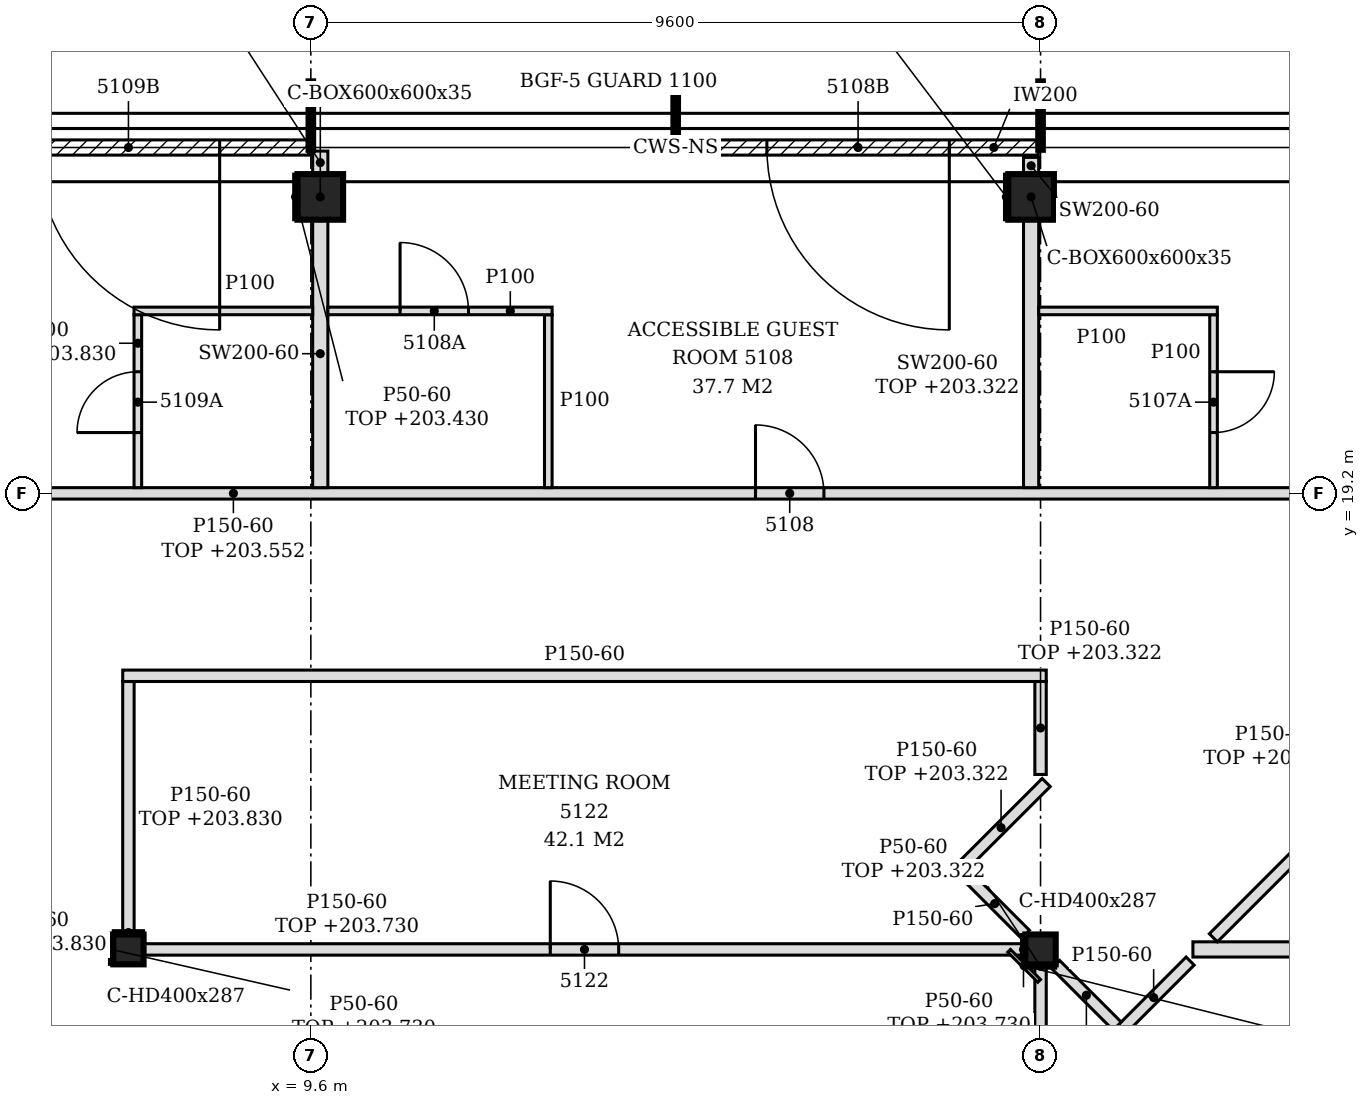
"""IFC4 building model, lengths in metres.
Left out: names, types, materials, properties, quantities, classifications, styles, units other than length and angle.
Written with IfcOpenShell. Run it as: python <this file> out.ifc"""

import sys

from ifc_helpers import new_model, si_unit, direction, frame, frame_2d, origin, origin_2d, place, context, subcontext, project, spatial, polyline, rectangle, hollow_rectangle, i_section, outline, extrude, clip, halfspace, element, fill, save


model = new_model("IFC4")
c1 = context("Model", 3, precision=1e-05, world=origin(), true_north=direction((0.0, 1.0)))
c2 = subcontext(c1, "Body", "Model", "MODEL_VIEW")
j1 = project(units=[si_unit("LENGTHUNIT", "METRE"), si_unit("PLANEANGLEUNIT", "RADIAN")], contexts=[c1])
p1 = place(None, origin())
s1 = spatial("IfcSite", under=j1, at=p1, CompositionType="ELEMENT")
p2 = place(p1, origin())
s2 = spatial("IfcBuilding", under=s1, at=p2, CompositionType="ELEMENT")
p3 = place(p2, frame((0.0, 0.0, 201.0)))
s3 = spatial("IfcBuildingStorey", under=s2, at=p3, CompositionType="ELEMENT", Elevation=201.0)
for number, where, z_axis, x_axis in (
    (1, (19.076, 23.1, -0.15), (0.0, 0.0, 1.0), (1.0, 0.0, 0.0)),
    (2, (9.724, 23.1, -0.15), (0.0, 0.0, 1.0), (1.0, 0.0, 0.0)),
):
    element("IfcColumn", number, at=place(p3, frame(where, z_axis=z_axis, x_axis=x_axis)), inside=s3, PredefinedType="COLUMN", context=c2, shape_type="Clipping", body=[
        clip(clip(extrude(hollow_rectangle(XDim=0.6, YDim=0.6, WallThickness=0.035, at=origin_2d()), origin(), (0.0, 0.0, 1.0), 3.5), halfspace(frame((0.0, 0.0, 0.011), z_axis=(0.0, 0.0, 1.0), x_axis=(1.0, 0.0, 0.0)), True)), halfspace(frame((0.0, 0.0, 3.095), z_axis=(0.0, 0.0, 1.0), x_axis=(1.0, 0.0, 0.0)), False)),
    ])
for number, where, z_axis, x_axis in (
    (3, (7.2, 13.2, -0.15), (0.0, 0.0, 1.0), (1.0, 0.0, 0.0)),
    (4, (19.2, 13.2, -0.15), (0.0, 0.0, 1.0), (1.0, 0.0, 0.0)),
):
    element("IfcColumn", number, at=place(p3, frame(where, z_axis=z_axis, x_axis=x_axis)), inside=s3, PredefinedType="COLUMN", context=c2, shape_type="SweptSolid", body=[
        extrude(i_section(OverallWidth=0.399, OverallDepth=0.393, WebThickness=0.023, FlangeThickness=0.037, FilletRadius=0.015, at=origin_2d()), origin(), (0.0, 0.0, 1.0), 3.5),
    ])
p4 = place(p3, frame((19.17, 23.75, 0.0), z_axis=(0.0, 0.0, 1.0), x_axis=(-1.0, 0.0, 0.0)))
e5 = element("IfcWall", 5, at=p4, inside=s3, PredefinedType="NOTDEFINED", context=c2, shape_type="SweptSolid", body=[
    extrude(rectangle(XDim=4.74, YDim=0.2, at=frame_2d((2.37, 0.0))), origin(), (0.0, 0.0, 1.0), 3.35),
])
p5 = place(p4, frame((1.17, 0.0, 0.0)))
e6 = element("IfcOpeningElement", 6, at=p5, cuts=e5, PredefinedType="OPENING", context=c2, shape_type="SweptSolid", body=[
    extrude(rectangle(XDim=2.4, YDim=2.4, at=frame_2d((1.2, 1.2))), frame((0.0, 0.11, 0.0), z_axis=(0.0, -1.0, 0.0), x_axis=(1.0, 0.0, 0.0)), (0.0, 0.0, 1.0), 0.22),
])
p6 = place(p3, frame((9.57, 23.75, 0.0), z_axis=(0.0, 0.0, 1.0), x_axis=(-1.0, 0.0, 0.0)))
e7 = element("IfcWall", 7, at=p6, inside=s3, PredefinedType="NOTDEFINED", context=c2, shape_type="SweptSolid", body=[
    extrude(rectangle(XDim=4.74, YDim=0.2, at=frame_2d((2.37, 0.0))), origin(), (0.0, 0.0, 1.0), 3.35),
])
p7 = place(p6, frame((1.17, 0.0, 0.0)))
e8 = element("IfcOpeningElement", 8, at=p7, cuts=e7, PredefinedType="OPENING", context=c2, shape_type="SweptSolid", body=[
    extrude(rectangle(XDim=2.4, YDim=2.4, at=frame_2d((1.2, 1.2))), frame((0.0, 0.11, 0.0), z_axis=(0.0, -1.0, 0.0), x_axis=(1.0, 0.0, 0.0)), (0.0, 0.0, 1.0), 0.22),
])
p8 = place(p3, frame((19.2, 2.596, 0.0), z_axis=(0.0, 0.0, 1.0), x_axis=(0.0, 1.0, 0.0)))
e9 = element("IfcWall", 9, at=p8, inside=s3, PredefinedType="PARTITIONING", context=c2, shape_type="SweptSolid", body=[
    extrude(rectangle(XDim=10.407, YDim=0.15, at=frame_2d((5.204, 0.0))), origin(), (0.0, 0.0, 1.0), 2.322),
])
p9 = place(p8, frame((3.553, 0.0, 0.0)))
e10 = element("IfcOpeningElement", 10, at=p9, cuts=e9, PredefinedType="OPENING", context=c2, shape_type="SweptSolid", body=[
    extrude(rectangle(XDim=0.9, YDim=2.1, at=frame_2d((0.45, 1.05))), frame((0.0, 0.085, 0.0), z_axis=(0.0, -1.0, 0.0), x_axis=(1.0, 0.0, 0.0)), (0.0, 0.0, 1.0), 0.17),
])
p10 = place(p3, frame((20.208, 12.086, 0.0), z_axis=(0.0, 0.0, 1.0), x_axis=(0.706747296365, 0.707466083343, 0.0)))
e11 = element("IfcWall", 11, at=p10, inside=s3, PredefinedType="PARTITIONING", context=c2, shape_type="SweptSolid", body=[
    extrude(rectangle(XDim=1.359, YDim=0.15, at=frame_2d((0.679, 0.0))), origin(), (0.0, 0.0, 1.0), 3.35),
])
p11 = place(p3, frame((20.208, 12.192, 0.0), z_axis=(0.0, 0.0, 1.0), x_axis=(-0.70721334539, 0.707000200921, 0.0)))
e12 = element("IfcWall", 12, at=p11, inside=s3, PredefinedType="PARTITIONING", context=c2, shape_type="SweptSolid", body=[
    extrude(rectangle(XDim=1.146, YDim=0.15, at=frame_2d((0.573, 0.0))), origin(), (0.0, 0.0, 1.0), 3.35),
])
p12 = place(p3, frame((7.399, 13.2, 0.0), z_axis=(0.0, 0.0, 1.0), x_axis=(1.0, 0.0, 0.0)))
e13 = element("IfcWall", 13, at=p12, inside=s3, PredefinedType="PARTITIONING", context=c2, shape_type="SweptSolid", body=[
    extrude(rectangle(XDim=11.601, YDim=0.15, at=frame_2d((5.801, 0.0))), origin(), (0.0, 0.0, 1.0), 2.73),
])
p13 = place(p12, frame((5.351, 0.0, 0.0)))
e14 = element("IfcOpeningElement", 14, at=p13, cuts=e13, PredefinedType="OPENING", context=c2, shape_type="SweptSolid", body=[
    extrude(rectangle(XDim=0.9, YDim=2.1, at=frame_2d((0.45, 1.05))), frame((0.0, 0.085, 0.0), z_axis=(0.0, -1.0, 0.0), x_axis=(1.0, 0.0, 0.0)), (0.0, 0.0, 1.0), 0.17),
])
p14 = place(p3, frame((21.205, 13.2, 0.0), z_axis=(0.0, 0.0, 1.0), x_axis=(1.0, 0.0, 0.0)))
e15 = element("IfcWall", 15, at=p14, inside=s3, PredefinedType="PARTITIONING", context=c2, shape_type="SweptSolid", body=[
    extrude(rectangle(XDim=8.007, YDim=0.2, at=frame_2d((4.004, 0.0))), origin(), (0.0, 0.0, 1.0), 3.35),
])
p15 = place(p3, frame((7.2, 13.396, 0.0), z_axis=(0.0, 0.0, 1.0), x_axis=(0.0, 1.0, 0.0)))
e16 = element("IfcWall", 16, at=p15, inside=s3, PredefinedType="PARTITIONING", context=c2, shape_type="SweptSolid", body=[
    extrude(rectangle(XDim=3.329, YDim=0.15, at=frame_2d((1.664, 0.0))), origin(), (0.0, 0.0, 1.0), 2.83),
])
p16 = place(p3, frame((19.002, 13.398, 0.0), z_axis=(0.0, 0.0, 1.0), x_axis=(-0.707000200921, 0.70721334539, 0.0)))
e17 = element("IfcWall", 17, at=p16, inside=s3, PredefinedType="PARTITIONING", context=c2, shape_type="SweptSolid", body=[
    extrude(rectangle(XDim=1.146, YDim=0.15, at=frame_2d((0.573, 0.0))), origin(), (0.0, 0.0, 1.0), 3.35),
])
p17 = place(p3, frame((21.474, 13.353, 0.0), z_axis=(0.0, 0.0, 1.0), x_axis=(0.707080773618, 0.707132787799, 0.0)))
e18 = element("IfcWall", 18, at=p17, inside=s3, PredefinedType="PARTITIONING", context=c2, shape_type="SweptSolid", body=[
    extrude(rectangle(XDim=4.694, YDim=0.15, at=frame_2d((2.347, 0.0))), origin(), (0.0, 0.0, 1.0), 2.78),
])
p18 = place(p3, frame((18.086, 14.208, 0.0), z_axis=(0.0, 0.0, 1.0), x_axis=(0.70739723372, 0.706816209298, 0.0)))
e19 = element("IfcWall", 19, at=p18, inside=s3, PredefinedType="PARTITIONING", context=c2, shape_type="SweptSolid", body=[
    extrude(rectangle(XDim=1.681, YDim=0.15, at=frame_2d((0.84, 0.0))), origin(), (0.0, 0.0, 1.0), 2.322),
])
p19 = place(p3, frame((19.2, 15.502, 0.0), z_axis=(0.0, 0.0, 1.0), x_axis=(0.0, 1.0, 0.0)))
e20 = element("IfcWall", 20, at=p19, inside=s3, PredefinedType="PARTITIONING", context=c2, shape_type="SweptSolid", body=[
    extrude(rectangle(XDim=1.223, YDim=0.15, at=frame_2d((0.612, 0.0))), origin(), (0.0, 0.0, 1.0), 2.322),
])
p20 = place(p3, frame((7.125, 16.8, 0.0), z_axis=(0.0, 0.0, 1.0), x_axis=(1.0, 0.0, 0.0)))
e21 = element("IfcWall", 21, at=p20, inside=s3, PredefinedType="PARTITIONING", context=c2, shape_type="SweptSolid", body=[
    extrude(outline(polyline([(0.0, 0.0), (12.15, 0.0), (12.15, 2.322), (11.924, 2.322), (11.922, 3.35), (0.225, 3.35), (0.223, 2.83), (0.0, 2.83), (0.0, 0.0)])), frame((0.0, 0.075, 0.0), z_axis=(0.0, -1.0, 0.0), x_axis=(1.0, 0.0, 0.0)), (0.0, 0.0, 1.0), 0.15),
])
p21 = place(p3, frame((-4.326, 19.2, 0.0), z_axis=(0.0, 0.0, 1.0), x_axis=(1.0, 0.0, 0.0)))
e22 = element("IfcWall", 22, at=p21, inside=s3, PredefinedType="PARTITIONING", context=c2, shape_type="SweptSolid", body=[
    extrude(outline(polyline([(0.0, 0.0), (31.244, 0.0), (31.244, 2.552), (23.677, 2.552), (23.675, 2.322), (23.375, 2.322), (23.373, 2.552), (1.51, 2.552), (1.508, 2.43), (0.087, 2.43), (0.085, 2.552), (0.0, 2.552), (0.0, 0.0)])), frame((0.0, 0.075, 0.0), z_axis=(0.0, -1.0, 0.0), x_axis=(1.0, 0.0, 0.0)), (0.0, 0.0, 1.0), 0.15),
])
p22 = place(p21, frame((28.02, 0.0, 0.0)))
e23 = element("IfcOpeningElement", 23, at=p22, cuts=e22, PredefinedType="OPENING", context=c2, shape_type="SweptSolid", body=[
    extrude(rectangle(XDim=0.9, YDim=2.1, at=frame_2d((0.45, 1.05))), frame((0.0, 0.085, 0.0), z_axis=(0.0, -1.0, 0.0), x_axis=(1.0, 0.0, 0.0)), (0.0, 0.0, 1.0), 0.17),
])
p23 = place(p21, frame((19.776, 0.0, 0.0)))
e24 = element("IfcOpeningElement", 24, at=p23, cuts=e22, PredefinedType="OPENING", context=c2, shape_type="SweptSolid", body=[
    extrude(rectangle(XDim=0.9, YDim=2.1, at=frame_2d((0.45, 1.05))), frame((0.0, 0.085, 0.0), z_axis=(0.0, -1.0, 0.0), x_axis=(1.0, 0.0, 0.0)), (0.0, 0.0, 1.0), 0.17),
])
p24 = place(p21, frame((5.138, 0.0, 0.0)))
e25 = element("IfcOpeningElement", 25, at=p24, cuts=e22, PredefinedType="OPENING", context=c2, shape_type="SweptSolid", body=[
    extrude(rectangle(XDim=0.9, YDim=2.1, at=frame_2d((0.45, 1.05))), frame((0.0, 0.085, 0.0), z_axis=(0.0, -1.0, 0.0), x_axis=(1.0, 0.0, 0.0)), (0.0, 0.0, 1.0), 0.17),
])
p25 = place(p3, frame((7.324, 19.275, 0.0), z_axis=(0.0, 0.0, 1.0), x_axis=(0.0, 1.0, 0.0)))
e26 = element("IfcWall", 26, at=p25, inside=s3, PredefinedType="PARTITIONING", context=c2, shape_type="SweptSolid", body=[
    extrude(outline(polyline([(0.0, 0.0), (2.275, 0.0), (2.275, 2.83), (0.03, 2.83), (0.028, 2.78), (0.0, 2.78), (0.0, 0.0)])), frame((0.0, 0.05, 0.0), z_axis=(0.0, -1.0, 0.0), x_axis=(1.0, 0.0, 0.0)), (0.0, 0.0, 1.0), 0.1),
])
p26 = place(p25, frame((0.725, 0.0, 0.0)))
e27 = element("IfcOpeningElement", 27, at=p26, cuts=e26, PredefinedType="OPENING", context=c2, shape_type="SweptSolid", body=[
    extrude(rectangle(XDim=0.8, YDim=2.1, at=frame_2d((0.4, 1.05))), frame((0.0, 0.06, 0.0), z_axis=(0.0, -1.0, 0.0), x_axis=(1.0, 0.0, 0.0)), (0.0, 0.0, 1.0), 0.12),
])
p27 = place(p3, frame((9.724, 19.275, 0.0), z_axis=(0.0, 0.0, 1.0), x_axis=(0.0, 1.0, 0.0)))
e28 = element("IfcWall", 28, at=p27, inside=s3, PredefinedType="PARTITIONING", context=c2, shape_type="SweptSolid", body=[
    extrude(outline(polyline([(0.0, 0.0), (3.525, 0.0), (3.525, 2.43), (3.375, 2.43), (3.373, 3.35), (0.03, 3.35), (0.028, 2.78), (0.0, 2.78), (0.0, 0.0)])), frame((0.0, 0.1, 0.0), z_axis=(0.0, -1.0, 0.0), x_axis=(1.0, 0.0, 0.0)), (0.0, 0.0, 1.0), 0.2),
])
p28 = place(p3, frame((12.724, 19.275, 0.0), z_axis=(0.0, 0.0, 1.0), x_axis=(0.0, 1.0, 0.0)))
e29 = element("IfcWall", 29, at=p28, inside=s3, PredefinedType="PARTITIONING", context=c2, shape_type="SweptSolid", body=[
    extrude(outline(polyline([(0.0, 0.0), (2.275, 0.0), (2.275, 3.35), (0.03, 3.35), (0.028, 2.78), (0.0, 2.78), (0.0, 0.0)])), frame((0.0, 0.05, 0.0), z_axis=(0.0, -1.0, 0.0), x_axis=(1.0, 0.0, 0.0)), (0.0, 0.0, 1.0), 0.1),
])
p29 = place(p3, frame((19.076, 19.275, 0.0), z_axis=(0.0, 0.0, 1.0), x_axis=(0.0, 1.0, 0.0)))
e30 = element("IfcWall", 30, at=p29, inside=s3, PredefinedType="PARTITIONING", context=c2, shape_type="SweptSolid", body=[
    extrude(rectangle(XDim=3.525, YDim=0.2, at=frame_2d((1.763, 0.0))), origin(), (0.0, 0.0, 1.0), 2.322),
])
p30 = place(p3, frame((21.476, 19.275, 0.0), z_axis=(0.0, 0.0, 1.0), x_axis=(0.0, 1.0, 0.0)))
e31 = element("IfcWall", 31, at=p30, inside=s3, PredefinedType="PARTITIONING", context=c2, shape_type="SweptSolid", body=[
    extrude(outline(polyline([(0.0, 0.0), (2.275, 0.0), (2.275, 3.35), (0.03, 3.35), (0.028, 2.78), (0.0, 2.78), (0.0, 0.0)])), frame((0.0, 0.05, 0.0), z_axis=(0.0, -1.0, 0.0), x_axis=(1.0, 0.0, 0.0)), (0.0, 0.0, 1.0), 0.1),
])
p31 = place(p30, frame((0.725, 0.0, 0.0)))
e32 = element("IfcOpeningElement", 32, at=p31, cuts=e31, PredefinedType="OPENING", context=c2, shape_type="SweptSolid", body=[
    extrude(rectangle(XDim=0.8, YDim=2.1, at=frame_2d((0.4, 1.05))), frame((0.0, 0.06, 0.0), z_axis=(0.0, -1.0, 0.0), x_axis=(1.0, 0.0, 0.0)), (0.0, 0.0, 1.0), 0.12),
])
p32 = place(p3, frame((7.274, 21.6, 0.0), z_axis=(0.0, 0.0, 1.0), x_axis=(1.0, 0.0, 0.0)))
e33 = element("IfcWall", 33, at=p32, inside=s3, PredefinedType="PARTITIONING", context=c2, shape_type="SweptSolid", body=[
    extrude(outline(polyline([(0.0, 0.0), (2.35, 0.0), (2.35, 3.35), (0.076, 3.35), (0.074, 2.83), (0.0, 2.83), (0.0, 0.0)])), frame((0.0, 0.05, 0.0), z_axis=(0.0, -1.0, 0.0), x_axis=(1.0, 0.0, 0.0)), (0.0, 0.0, 1.0), 0.1),
])
p33 = place(p3, frame((9.824, 21.6, 0.0), z_axis=(0.0, 0.0, 1.0), x_axis=(1.0, 0.0, 0.0)))
e34 = element("IfcWall", 34, at=p33, inside=s3, PredefinedType="PARTITIONING", context=c2, shape_type="SweptSolid", body=[
    extrude(rectangle(XDim=2.95, YDim=0.1, at=frame_2d((1.475, 0.0))), origin(), (0.0, 0.0, 1.0), 3.35),
])
p34 = place(p33, frame((0.95, 0.0, 0.0)))
e35 = element("IfcOpeningElement", 35, at=p34, cuts=e34, PredefinedType="OPENING", context=c2, shape_type="SweptSolid", body=[
    extrude(rectangle(XDim=0.9, YDim=2.1, at=frame_2d((0.45, 1.05))), frame((0.0, 0.06, 0.0), z_axis=(0.0, -1.0, 0.0), x_axis=(1.0, 0.0, 0.0)), (0.0, 0.0, 1.0), 0.12),
])
p35 = place(p3, frame((19.176, 21.6, 0.0), z_axis=(0.0, 0.0, 1.0), x_axis=(1.0, 0.0, 0.0)))
e36 = element("IfcWall", 36, at=p35, inside=s3, PredefinedType="PARTITIONING", context=c2, shape_type="SweptSolid", body=[
    extrude(outline(polyline([(0.0, 0.0), (2.35, 0.0), (2.35, 3.35), (0.175, 3.35), (0.173, 2.322), (0.0, 2.322), (0.0, 0.0)])), frame((0.0, 0.05, 0.0), z_axis=(0.0, -1.0, 0.0), x_axis=(1.0, 0.0, 0.0)), (0.0, 0.0, 1.0), 0.1),
])
p36 = place(p3, frame((9.724, 23.4, 0.0), z_axis=(0.0, 0.0, 1.0), x_axis=(0.0, 1.0, 0.0)))
e37 = element("IfcWall", 37, at=p36, inside=s3, PredefinedType="PARTITIONING", context=c2, shape_type="SweptSolid", body=[
    extrude(outline(polyline([(0.0, 0.0), (0.303, 0.0), (0.303, 3.35), (0.15, 3.35), (0.148, 2.43), (0.0, 2.43), (0.0, 0.0)])), frame((0.0, 0.1, 0.0), z_axis=(0.0, -1.0, 0.0), x_axis=(1.0, 0.0, 0.0)), (0.0, 0.0, 1.0), 0.2),
])
p37 = place(p3, frame((19.076, 23.4, 0.0), z_axis=(0.0, 0.0, 1.0), x_axis=(0.0, 1.0, 0.0)))
e38 = element("IfcWall", 38, at=p37, inside=s3, PredefinedType="PARTITIONING", context=c2, shape_type="SweptSolid", body=[
    extrude(outline(polyline([(0.0, 0.0), (0.22, 0.0), (0.22, 3.35), (0.15, 3.35), (0.148, 2.43), (0.0, 2.43), (0.0, 0.0)])), frame((0.0, 0.1, 0.0), z_axis=(0.0, -1.0, 0.0), x_axis=(1.0, 0.0, 0.0)), (0.0, 0.0, 1.0), 0.2),
])
p38 = place(p3, frame((18.976, 13.003, 0.0), z_axis=(0.0, 0.0, 1.0), x_axis=(0.0, 1.0, 0.0)))
e39 = element("IfcWall", 39, at=p38, inside=s3, PredefinedType="PARTITIONING", context=c2, shape_type="SweptSolid", body=[
    extrude(rectangle(XDim=0.393, YDim=0.05, at=frame_2d((0.197, 0.0))), origin(), (0.0, 0.0, 1.0), 2.73),
])
p39 = place(p3, frame((19.182, 12.786, 0.0), z_axis=(0.0, 0.0, 1.0), x_axis=(-0.707106781187, 0.707106781187, 0.0)))
e40 = element("IfcWall", 40, at=p39, inside=s3, PredefinedType="PARTITIONING", context=c2, shape_type="SweptSolid", body=[
    extrude(rectangle(XDim=0.56, YDim=0.05, at=frame_2d((0.28, 0.0))), origin(), (0.0, 0.0, 1.0), 2.322),
])
p40 = place(p3, frame((7.0, 13.421, 0.0), z_axis=(0.0, 0.0, 1.0), x_axis=(1.0, 0.0, 0.0)))
e41 = element("IfcWall", 41, at=p40, inside=s3, PredefinedType="PARTITIONING", context=c2, shape_type="SweptSolid", body=[
    extrude(rectangle(XDim=0.399, YDim=0.05, at=frame_2d((0.199, 0.0))), origin(), (0.0, 0.0, 1.0), 2.83),
])
p41 = place(p3, frame((19.0, 12.979, 0.0), z_axis=(0.0, 0.0, 1.0), x_axis=(1.0, 0.0, 0.0)))
e42 = element("IfcWall", 42, at=p41, inside=s3, PredefinedType="PARTITIONING", context=c2, shape_type="SweptSolid", body=[
    extrude(rectangle(XDim=0.399, YDim=0.05, at=frame_2d((0.199, 0.0))), origin(), (0.0, 0.0, 1.0), 2.322),
])
p42 = place(p3, frame((6.976, 13.003, 0.0), z_axis=(0.0, 0.0, 1.0), x_axis=(0.0, 1.0, 0.0)))
e43 = element("IfcWall", 43, at=p42, inside=s3, PredefinedType="PARTITIONING", context=c2, shape_type="SweptSolid", body=[
    extrude(rectangle(XDim=0.393, YDim=0.05, at=frame_2d((0.197, 0.0))), origin(), (0.0, 0.0, 1.0), 2.73),
])
for number, where, z_axis, x_axis in (
    (44, (9.399, 22.8, 0.0), (0.0, 0.0, 1.0), (0.0, 1.0, 0.0)),
    (45, (18.751, 22.8, 0.0), (0.0, 0.0, 1.0), (0.0, 1.0, 0.0)),
):
    element("IfcWall", number, at=place(p3, frame(where, z_axis=z_axis, x_axis=x_axis)), inside=s3, PredefinedType="PARTITIONING", context=c2, shape_type="SweptSolid", body=[
        extrude(rectangle(XDim=0.6, YDim=0.05, at=frame_2d((0.3, 0.0))), origin(), (0.0, 0.0, 1.0), 2.43),
    ])
p43 = place(p5, origin())
e46 = element("IfcDoor", 46, at=p43, inside=s3, OperationType="SINGLE_SWING_LEFT", PredefinedType="DOOR", context=c2, shape_type="SweptSolid", body=[
    extrude(rectangle(XDim=2.4, YDim=2.4, at=frame_2d((1.2, 1.2))), frame((0.0, 0.025, 0.0), z_axis=(0.0, -1.0, 0.0), x_axis=(1.0, 0.0, 0.0)), (0.0, 0.0, 1.0), 0.05),
])
fill(e6, e46)
p44 = place(p7, origin())
e47 = element("IfcDoor", 47, at=p44, inside=s3, OperationType="SINGLE_SWING_LEFT", PredefinedType="DOOR", context=c2, shape_type="SweptSolid", body=[
    extrude(rectangle(XDim=2.4, YDim=2.4, at=frame_2d((1.2, 1.2))), frame((0.0, 0.025, 0.0), z_axis=(0.0, -1.0, 0.0), x_axis=(1.0, 0.0, 0.0)), (0.0, 0.0, 1.0), 0.05),
])
fill(e8, e47)
p45 = place(p31, frame((0.8, 0.0, 0.0), z_axis=(0.0, 0.0, 1.0), x_axis=(-1.0, 0.0, 0.0)))
e48 = element("IfcDoor", 48, at=p45, inside=s3, OperationType="SINGLE_SWING_LEFT", PredefinedType="DOOR", context=c2, shape_type="SweptSolid", body=[
    extrude(rectangle(XDim=0.8, YDim=2.1, at=frame_2d((0.4, 1.05))), frame((0.0, 0.025, 0.0), z_axis=(0.0, -1.0, 0.0), x_axis=(1.0, 0.0, 0.0)), (0.0, 0.0, 1.0), 0.05),
])
fill(e32, e48)
p46 = place(p23, origin())
e49 = element("IfcDoor", 49, at=p46, inside=s3, OperationType="SINGLE_SWING_LEFT", PredefinedType="DOOR", context=c2, shape_type="SweptSolid", body=[
    extrude(rectangle(XDim=0.9, YDim=2.1, at=frame_2d((0.45, 1.05))), frame((0.0, 0.025, 0.0), z_axis=(0.0, -1.0, 0.0), x_axis=(1.0, 0.0, 0.0)), (0.0, 0.0, 1.0), 0.05),
])
fill(e24, e49)
p47 = place(p34, origin())
e50 = element("IfcDoor", 50, at=p47, inside=s3, OperationType="SINGLE_SWING_LEFT", PredefinedType="DOOR", context=c2, shape_type="SweptSolid", body=[
    extrude(rectangle(XDim=0.9, YDim=2.1, at=frame_2d((0.45, 1.05))), frame((0.0, 0.025, 0.0), z_axis=(0.0, -1.0, 0.0), x_axis=(1.0, 0.0, 0.0)), (0.0, 0.0, 1.0), 0.05),
])
fill(e35, e50)
p48 = place(p26, origin())
e51 = element("IfcDoor", 51, at=p48, inside=s3, OperationType="SINGLE_SWING_LEFT", PredefinedType="DOOR", context=c2, shape_type="SweptSolid", body=[
    extrude(rectangle(XDim=0.8, YDim=2.1, at=frame_2d((0.4, 1.05))), frame((0.0, 0.025, 0.0), z_axis=(0.0, -1.0, 0.0), x_axis=(1.0, 0.0, 0.0)), (0.0, 0.0, 1.0), 0.05),
])
fill(e27, e51)
p49 = place(p13, origin())
e52 = element("IfcDoor", 52, at=p49, inside=s3, OperationType="SINGLE_SWING_LEFT", PredefinedType="DOOR", context=c2, shape_type="SweptSolid", body=[
    extrude(rectangle(XDim=0.9, YDim=2.1, at=frame_2d((0.45, 1.05))), frame((0.0, 0.025, 0.0), z_axis=(0.0, -1.0, 0.0), x_axis=(1.0, 0.0, 0.0)), (0.0, 0.0, 1.0), 0.05),
])
fill(e14, e52)
save(model, sys.argv[1])
